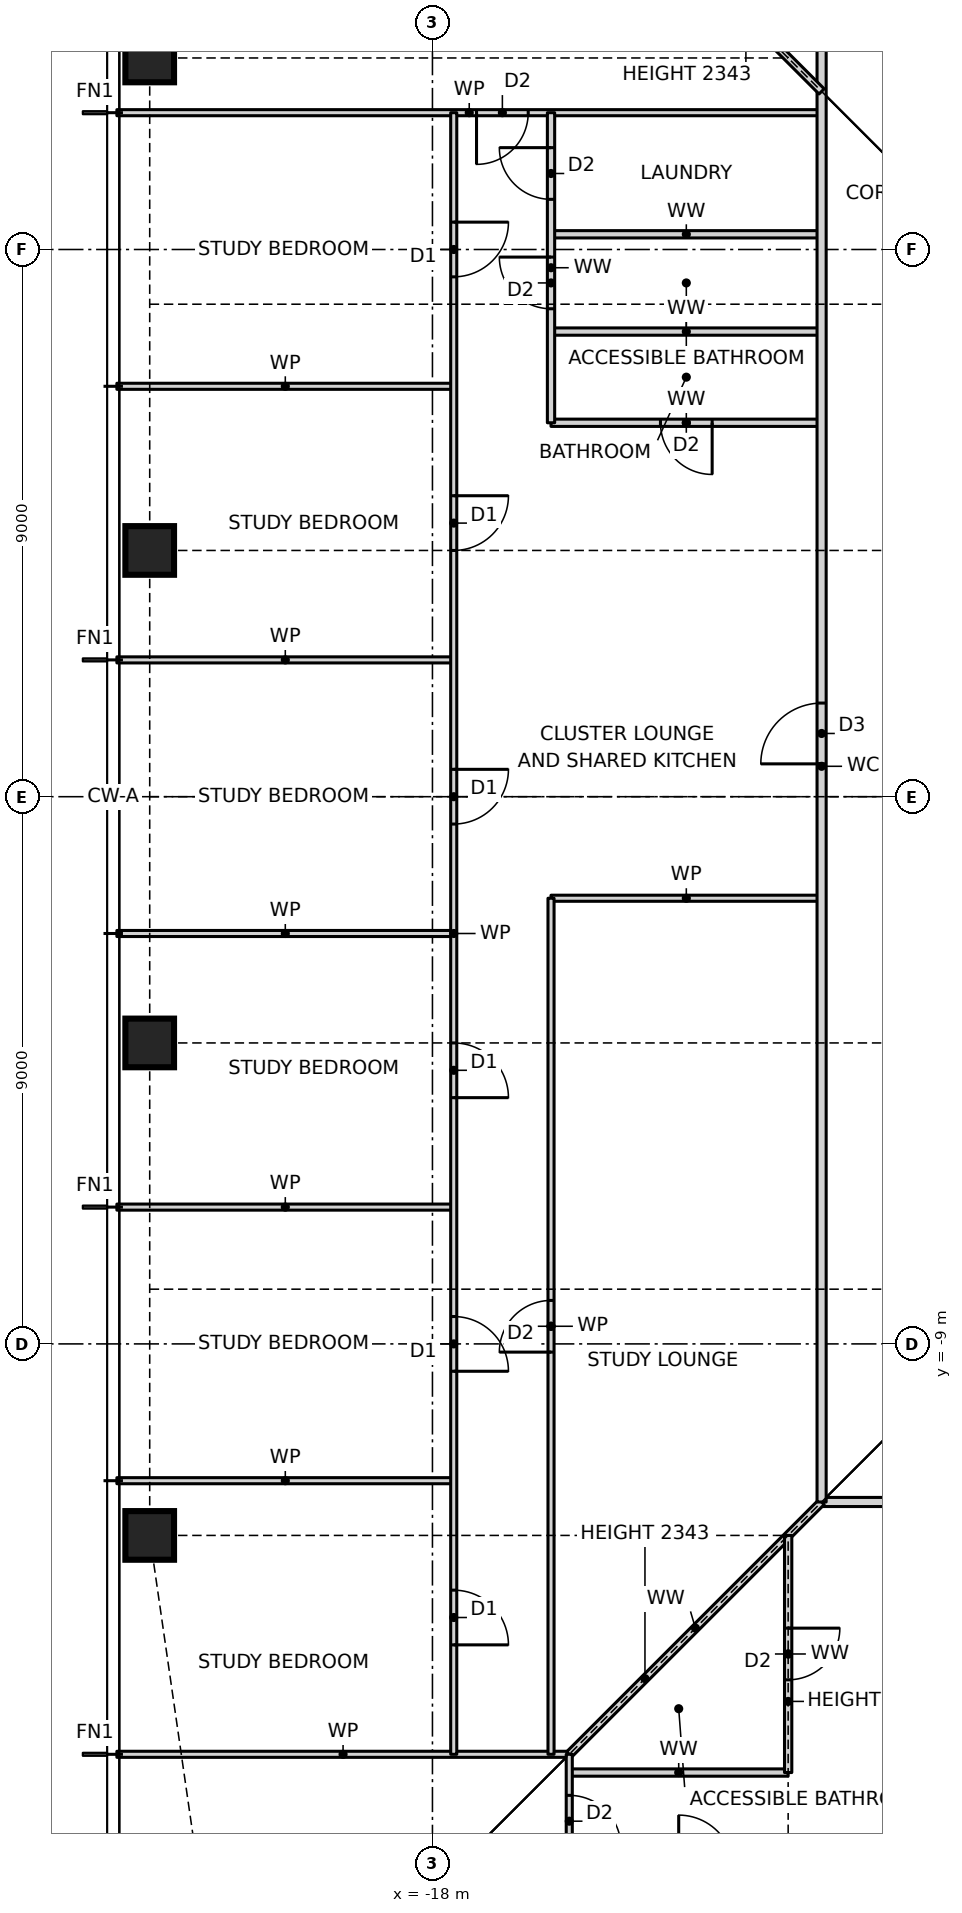
"""IFC4 building model, lengths in metres.
Left out: names, types, materials, properties, quantities, classifications, styles, units other than length and angle.
Written with IfcOpenShell. Run it as: python <this file> out.ifc"""

import sys

from ifc_helpers import new_model, si_unit, direction, frame, frame_2d, origin, origin_2d, place, context, subcontext, project, spatial, rectangle, hollow_rectangle, extrude, element, fill, save


model = new_model("IFC4")
c1 = context("Model", 3, precision=1e-05, world=origin(), true_north=direction((0.0, 1.0)))
c2 = subcontext(c1, "Body", "Model", "MODEL_VIEW")
j1 = project(units=[si_unit("LENGTHUNIT", "METRE"), si_unit("PLANEANGLEUNIT", "RADIAN")], contexts=[c1])
p1 = place(None, origin())
s1 = spatial("IfcSite", under=j1, at=p1, CompositionType="ELEMENT")
p2 = place(p1, origin())
s2 = spatial("IfcBuilding", under=s1, at=p2, CompositionType="ELEMENT")
p3 = place(p2, frame((0.0, 0.0, 43.0)))
s3 = spatial("IfcBuildingStorey", under=s2, at=p3, CompositionType="ELEMENT", Elevation=43.0)
for number, where, z_axis, x_axis in (
    (1, (-22.65, 12.15, 0.0), (0.0, 0.0, 1.0), (1.0, 0.0, 0.0)),
    (2, (-22.65, 4.05, 0.0), (0.0, 0.0, 1.0), (1.0, 0.0, 0.0)),
    (3, (-22.65, -4.05, 0.0), (0.0, 0.0, 1.0), (1.0, 0.0, 0.0)),
    (4, (-22.65, -12.15, 0.0), (0.0, 0.0, 1.0), (1.0, 0.0, 0.0)),
):
    element("IfcColumn", number, at=place(p3, frame(where, z_axis=z_axis, x_axis=x_axis)), inside=s3, PredefinedType="COLUMN", context=c2, shape_type="SweptSolid", body=[
        extrude(hollow_rectangle(XDim=0.8, YDim=0.8, WallThickness=0.09, at=origin_2d()), origin(), (0.0, 0.0, 1.0), 3.5),
    ])
p4 = place(p3, frame((-15.75, -16.05, 0.0), z_axis=(0.0, 0.0, 1.0), x_axis=(1.0, 0.0, 0.0)))
e5 = element("IfcWall", 5, at=p4, inside=s3, PredefinedType="PARTITIONING", context=c2, shape_type="SweptSolid", body=[
    extrude(rectangle(XDim=3.6, YDim=0.12, at=frame_2d((1.8, 0.0))), origin(), (0.0, 0.0, 1.0), 3.27),
])
p5 = place(p3, frame((-23.19, -15.75, 0.0), z_axis=(0.0, 0.0, 1.0), x_axis=(1.0, 0.0, 0.0)))
e6 = element("IfcWall", 6, at=p5, inside=s3, PredefinedType="PARTITIONING", context=c2, shape_type="SweptSolid", body=[
    extrude(rectangle(XDim=7.44, YDim=0.1, at=frame_2d((3.72, 0.0))), origin(), (0.0, 0.0, 1.0), 3.27),
])
p6 = place(p3, frame((-11.6, -11.6, 0.0), z_axis=(0.0, 0.0, 1.0), x_axis=(1.0, 0.0, 0.0)))
e7 = element("IfcWall", 7, at=p6, inside=s3, PredefinedType="PARTITIONING", context=c2, shape_type="SweptSolid", body=[
    extrude(rectangle(XDim=23.2, YDim=0.15, at=frame_2d((11.6, 0.0))), origin(), (0.0, 0.0, 1.0), 3.27),
])
p7 = place(p6, frame((2.975, 0.0, 0.0)))
e8 = element("IfcOpeningElement", 8, at=p7, cuts=e7, PredefinedType="OPENING", context=c2, shape_type="SweptSolid", body=[
    extrude(rectangle(XDim=1.0, YDim=2.1, at=frame_2d((0.5, 1.05))), frame((0.0, 0.085, 0.0), z_axis=(0.0, -1.0, 0.0), x_axis=(1.0, 0.0, 0.0)), (0.0, 0.0, 1.0), 0.17),
])
p8 = place(p6, frame((18.6, 0.0, 0.0)))
e9 = element("IfcOpeningElement", 9, at=p8, cuts=e7, PredefinedType="OPENING", context=c2, shape_type="SweptSolid", body=[
    extrude(rectangle(XDim=1.0, YDim=2.1, at=frame_2d((0.5, 1.05))), frame((0.0, 0.085, 0.0), z_axis=(0.0, -1.0, 0.0), x_axis=(1.0, 0.0, 0.0)), (0.0, 0.0, 1.0), 0.17),
])
for number, where, z_axis, x_axis in (
    (10, (-23.19, -11.25, 0.0), (0.0, 0.0, 1.0), (1.0, 0.0, 0.0)),
    (11, (-23.19, -6.75, 0.0), (0.0, 0.0, 1.0), (1.0, 0.0, 0.0)),
    (12, (-23.19, -2.25, 0.0), (0.0, 0.0, 1.0), (1.0, 0.0, 0.0)),
):
    element("IfcWall", number, at=place(p3, frame(where, z_axis=z_axis, x_axis=x_axis)), inside=s3, PredefinedType="PARTITIONING", context=c2, shape_type="SweptSolid", body=[
        extrude(rectangle(XDim=5.54, YDim=0.1, at=frame_2d((2.77, 0.0))), origin(), (0.0, 0.0, 1.0), 3.27),
    ])
p9 = place(p3, frame((-16.05, -1.67, 0.0), z_axis=(0.0, 0.0, 1.0), x_axis=(1.0, 0.0, 0.0)))
e13 = element("IfcWall", 13, at=p9, inside=s3, PredefinedType="PARTITIONING", context=c2, shape_type="SweptSolid", body=[
    extrude(rectangle(XDim=4.45, YDim=0.1, at=frame_2d((2.225, 0.0))), origin(), (0.0, 0.0, 1.0), 3.27),
])
p10 = place(p3, frame((-23.19, 2.25, 0.0), z_axis=(0.0, 0.0, 1.0), x_axis=(1.0, 0.0, 0.0)))
e14 = element("IfcWall", 14, at=p10, inside=s3, PredefinedType="PARTITIONING", context=c2, shape_type="SweptSolid", body=[
    extrude(rectangle(XDim=5.54, YDim=0.1, at=frame_2d((2.77, 0.0))), origin(), (0.0, 0.0, 1.0), 3.27),
])
p11 = place(p3, frame((-16.05, 6.15, 0.0), z_axis=(0.0, 0.0, 1.0), x_axis=(1.0, 0.0, 0.0)))
e15 = element("IfcWall", 15, at=p11, inside=s3, PredefinedType="PARTITIONING", context=c2, shape_type="SweptSolid", body=[
    extrude(rectangle(XDim=4.45, YDim=0.12, at=frame_2d((2.225, 0.0))), origin(), (0.0, 0.0, 1.0), 3.27),
])
p12 = place(p11, frame((1.8, 0.0, 0.0)))
e16 = element("IfcOpeningElement", 16, at=p12, cuts=e15, PredefinedType="OPENING", context=c2, shape_type="SweptSolid", body=[
    extrude(rectangle(XDim=0.85, YDim=2.1, at=frame_2d((0.425, 1.05))), frame((0.0, 0.07, 0.0), z_axis=(0.0, -1.0, 0.0), x_axis=(1.0, 0.0, 0.0)), (0.0, 0.0, 1.0), 0.14),
])
p13 = place(p3, frame((-23.19, 6.75, 0.0), z_axis=(0.0, 0.0, 1.0), x_axis=(1.0, 0.0, 0.0)))
e17 = element("IfcWall", 17, at=p13, inside=s3, PredefinedType="PARTITIONING", context=c2, shape_type="SweptSolid", body=[
    extrude(rectangle(XDim=5.54, YDim=0.1, at=frame_2d((2.77, 0.0))), origin(), (0.0, 0.0, 1.0), 3.27),
])
for number, where, z_axis, x_axis in (
    (18, (-16.05, 7.65, 0.0), (0.0, 0.0, 1.0), (1.0, 0.0, 0.0)),
    (19, (-16.05, 9.25, 0.0), (0.0, 0.0, 1.0), (1.0, 0.0, 0.0)),
):
    element("IfcWall", number, at=place(p3, frame(where, z_axis=z_axis, x_axis=x_axis)), inside=s3, PredefinedType="PARTITIONING", context=c2, shape_type="SweptSolid", body=[
        extrude(rectangle(XDim=4.45, YDim=0.12, at=frame_2d((2.225, 0.0))), origin(), (0.0, 0.0, 1.0), 3.27),
    ])
p14 = place(p3, frame((-23.19, 11.25, 0.0), z_axis=(0.0, 0.0, 1.0), x_axis=(1.0, 0.0, 0.0)))
e20 = element("IfcWall", 20, at=p14, inside=s3, PredefinedType="PARTITIONING", context=c2, shape_type="SweptSolid", body=[
    extrude(rectangle(XDim=11.59, YDim=0.1, at=frame_2d((5.795, 0.0))), origin(), (0.0, 0.0, 1.0), 3.27),
])
p15 = place(p14, frame((5.915, 0.0, 0.0)))
e21 = element("IfcOpeningElement", 21, at=p15, cuts=e20, PredefinedType="OPENING", context=c2, shape_type="SweptSolid", body=[
    extrude(rectangle(XDim=0.85, YDim=2.1, at=frame_2d((0.425, 1.05))), frame((0.0, 0.06, 0.0), z_axis=(0.0, -1.0, 0.0), x_axis=(1.0, 0.0, 0.0)), (0.0, 0.0, 1.0), 0.12),
])
p16 = place(p3, frame((-15.75, -15.75, 0.0), z_axis=(0.0, 0.0, 1.0), x_axis=(0.707106781187, 0.707106781187, 0.0)))
e22 = element("IfcWall", 22, at=p16, inside=s3, PredefinedType="PARTITIONING", context=c2, shape_type="SweptSolid", body=[
    extrude(rectangle(XDim=5.869, YDim=0.12, at=frame_2d((2.935, 0.0))), origin(), (0.0, 0.0, 1.0), 2.343),
])
p17 = place(p3, frame((-11.6, -11.6, 0.0), z_axis=(0.0, 0.0, 1.0), x_axis=(0.0, 1.0, 0.0)))
e23 = element("IfcWall", 23, at=p17, inside=s3, PredefinedType="PARTITIONING", context=c2, shape_type="SweptSolid", body=[
    extrude(rectangle(XDim=24.2, YDim=0.15, at=frame_2d((12.1, 0.0))), origin(), (0.0, 0.0, 1.0), 3.27),
])
p18 = place(p17, frame((12.14, 0.0, 0.0)))
e24 = element("IfcOpeningElement", 24, at=p18, cuts=e23, PredefinedType="OPENING", context=c2, shape_type="SweptSolid", body=[
    extrude(rectangle(XDim=1.0, YDim=2.1, at=frame_2d((0.5, 1.05))), frame((0.0, 0.085, 0.0), z_axis=(0.0, -1.0, 0.0), x_axis=(1.0, 0.0, 0.0)), (0.0, 0.0, 1.0), 0.17),
])
p19 = place(p3, frame((-12.15, -16.05, 0.0), z_axis=(0.0, 0.0, 1.0), x_axis=(0.0, 1.0, 0.0)))
e25 = element("IfcWall", 25, at=p19, inside=s3, PredefinedType="PARTITIONING", context=c2, shape_type="SweptSolid", body=[
    extrude(rectangle(XDim=3.9, YDim=0.12, at=frame_2d((1.95, 0.0))), origin(), (0.0, 0.0, 1.0), 2.508),
])
p20 = place(p19, frame((1.525, 0.0, 0.0)))
e26 = element("IfcOpeningElement", 26, at=p20, cuts=e25, PredefinedType="OPENING", context=c2, shape_type="SweptSolid", body=[
    extrude(rectangle(XDim=0.85, YDim=2.1, at=frame_2d((0.425, 1.05))), frame((0.0, 0.07, 0.0), z_axis=(0.0, -1.0, 0.0), x_axis=(1.0, 0.0, 0.0)), (0.0, 0.0, 1.0), 0.14),
])
p21 = place(p3, frame((-15.75, -23.19, 0.0), z_axis=(0.0, 0.0, 1.0), x_axis=(0.0, 1.0, 0.0)))
e27 = element("IfcWall", 27, at=p21, inside=s3, PredefinedType="PARTITIONING", context=c2, shape_type="SweptSolid", body=[
    extrude(rectangle(XDim=7.44, YDim=0.1, at=frame_2d((3.72, 0.0))), origin(), (0.0, 0.0, 1.0), 3.27),
])
p22 = place(p21, frame((5.915, 0.0, 0.0)))
e28 = element("IfcOpeningElement", 28, at=p22, cuts=e27, PredefinedType="OPENING", context=c2, shape_type="SweptSolid", body=[
    extrude(rectangle(XDim=0.85, YDim=2.1, at=frame_2d((0.425, 1.05))), frame((0.0, 0.06, 0.0), z_axis=(0.0, -1.0, 0.0), x_axis=(1.0, 0.0, 0.0)), (0.0, 0.0, 1.0), 0.12),
])
p23 = place(p3, frame((-16.05, -15.75, 0.0), z_axis=(0.0, 0.0, 1.0), x_axis=(0.0, 1.0, 0.0)))
e29 = element("IfcWall", 29, at=p23, inside=s3, PredefinedType="PARTITIONING", context=c2, shape_type="SweptSolid", body=[
    extrude(rectangle(XDim=14.08, YDim=0.1, at=frame_2d((7.04, 0.0))), origin(), (0.0, 0.0, 1.0), 3.27),
])
p24 = place(p23, frame((6.615, 0.0, 0.0)))
e30 = element("IfcOpeningElement", 30, at=p24, cuts=e29, PredefinedType="OPENING", context=c2, shape_type="SweptSolid", body=[
    extrude(rectangle(XDim=0.85, YDim=2.1, at=frame_2d((0.425, 1.05))), frame((0.0, 0.06, 0.0), z_axis=(0.0, -1.0, 0.0), x_axis=(1.0, 0.0, 0.0)), (0.0, 0.0, 1.0), 0.12),
])
p25 = place(p3, frame((-16.05, 6.15, 0.0), z_axis=(0.0, 0.0, 1.0), x_axis=(0.0, 1.0, 0.0)))
e31 = element("IfcWall", 31, at=p25, inside=s3, PredefinedType="PARTITIONING", context=c2, shape_type="SweptSolid", body=[
    extrude(rectangle(XDim=5.1, YDim=0.12, at=frame_2d((2.55, 0.0))), origin(), (0.0, 0.0, 1.0), 3.27),
])
p26 = place(p25, frame((3.675, 0.0, 0.0)))
e32 = element("IfcOpeningElement", 32, at=p26, cuts=e31, PredefinedType="OPENING", context=c2, shape_type="SweptSolid", body=[
    extrude(rectangle(XDim=0.85, YDim=2.1, at=frame_2d((0.425, 1.05))), frame((0.0, 0.07, 0.0), z_axis=(0.0, -1.0, 0.0), x_axis=(1.0, 0.0, 0.0)), (0.0, 0.0, 1.0), 0.14),
])
p27 = place(p25, frame((1.875, 0.0, 0.0)))
e33 = element("IfcOpeningElement", 33, at=p27, cuts=e31, PredefinedType="OPENING", context=c2, shape_type="SweptSolid", body=[
    extrude(rectangle(XDim=0.85, YDim=2.1, at=frame_2d((0.425, 1.05))), frame((0.0, 0.07, 0.0), z_axis=(0.0, -1.0, 0.0), x_axis=(1.0, 0.0, 0.0)), (0.0, 0.0, 1.0), 0.14),
])
p28 = place(p3, frame((-17.65, -15.75, 0.0), z_axis=(0.0, 0.0, 1.0), x_axis=(0.0, 1.0, 0.0)))
e34 = element("IfcWall", 34, at=p28, inside=s3, PredefinedType="PARTITIONING", context=c2, shape_type="SweptSolid", body=[
    extrude(rectangle(XDim=27.0, YDim=0.1, at=frame_2d((13.5, 0.0))), origin(), (0.0, 0.0, 1.0), 3.27),
])
p29 = place(p28, frame((24.3, 0.0, 0.0)))
e35 = element("IfcOpeningElement", 35, at=p29, cuts=e34, PredefinedType="OPENING", context=c2, shape_type="SweptSolid", body=[
    extrude(rectangle(XDim=0.9, YDim=2.1, at=frame_2d((0.45, 1.05))), frame((0.0, 0.06, 0.0), z_axis=(0.0, -1.0, 0.0), x_axis=(1.0, 0.0, 0.0)), (0.0, 0.0, 1.0), 0.12),
])
p30 = place(p28, frame((19.8, 0.0, 0.0)))
e36 = element("IfcOpeningElement", 36, at=p30, cuts=e34, PredefinedType="OPENING", context=c2, shape_type="SweptSolid", body=[
    extrude(rectangle(XDim=0.9, YDim=2.1, at=frame_2d((0.45, 1.05))), frame((0.0, 0.06, 0.0), z_axis=(0.0, -1.0, 0.0), x_axis=(1.0, 0.0, 0.0)), (0.0, 0.0, 1.0), 0.12),
])
p31 = place(p28, frame((15.3, 0.0, 0.0)))
e37 = element("IfcOpeningElement", 37, at=p31, cuts=e34, PredefinedType="OPENING", context=c2, shape_type="SweptSolid", body=[
    extrude(rectangle(XDim=0.9, YDim=2.1, at=frame_2d((0.45, 1.05))), frame((0.0, 0.06, 0.0), z_axis=(0.0, -1.0, 0.0), x_axis=(1.0, 0.0, 0.0)), (0.0, 0.0, 1.0), 0.12),
])
p32 = place(p28, frame((10.8, 0.0, 0.0)))
e38 = element("IfcOpeningElement", 38, at=p32, cuts=e34, PredefinedType="OPENING", context=c2, shape_type="SweptSolid", body=[
    extrude(rectangle(XDim=0.9, YDim=2.1, at=frame_2d((0.45, 1.05))), frame((0.0, 0.06, 0.0), z_axis=(0.0, -1.0, 0.0), x_axis=(1.0, 0.0, 0.0)), (0.0, 0.0, 1.0), 0.12),
])
p33 = place(p28, frame((6.3, 0.0, 0.0)))
e39 = element("IfcOpeningElement", 39, at=p33, cuts=e34, PredefinedType="OPENING", context=c2, shape_type="SweptSolid", body=[
    extrude(rectangle(XDim=0.9, YDim=2.1, at=frame_2d((0.45, 1.05))), frame((0.0, 0.06, 0.0), z_axis=(0.0, -1.0, 0.0), x_axis=(1.0, 0.0, 0.0)), (0.0, 0.0, 1.0), 0.12),
])
p34 = place(p28, frame((1.8, 0.0, 0.0)))
e40 = element("IfcOpeningElement", 40, at=p34, cuts=e34, PredefinedType="OPENING", context=c2, shape_type="SweptSolid", body=[
    extrude(rectangle(XDim=0.9, YDim=2.1, at=frame_2d((0.45, 1.05))), frame((0.0, 0.06, 0.0), z_axis=(0.0, -1.0, 0.0), x_axis=(1.0, 0.0, 0.0)), (0.0, 0.0, 1.0), 0.12),
])
p35 = place(p3, frame((-11.6, 11.6, 0.0), z_axis=(0.0, 0.0, 1.0), x_axis=(-0.707106781187, 0.707106781187, 0.0)))
e41 = element("IfcWall", 41, at=p35, inside=s3, PredefinedType="PARTITIONING", context=c2, shape_type="SweptSolid", body=[
    extrude(rectangle(XDim=5.869, YDim=0.12, at=frame_2d((2.935, 0.0))), origin(), (0.0, 0.0, 1.0), 2.343),
])
p36 = place(p20, frame((0.85, 0.0, 0.0), z_axis=(0.0, 0.0, 1.0), x_axis=(-1.0, 0.0, 0.0)))
e42 = element("IfcDoor", 42, at=p36, inside=s3, OperationType="SINGLE_SWING_LEFT", PredefinedType="DOOR", context=c2, shape_type="SweptSolid", body=[
    extrude(rectangle(XDim=0.85, YDim=2.1, at=frame_2d((0.425, 1.05))), frame((0.0, 0.025, 0.0), z_axis=(0.0, -1.0, 0.0), x_axis=(1.0, 0.0, 0.0)), (0.0, 0.0, 1.0), 0.05),
])
fill(e26, e42)
p37 = place(p15, frame((0.85, 0.0, 0.0), z_axis=(0.0, 0.0, 1.0), x_axis=(-1.0, 0.0, 0.0)))
e43 = element("IfcDoor", 43, at=p37, inside=s3, OperationType="SINGLE_SWING_RIGHT", PredefinedType="DOOR", context=c2, shape_type="SweptSolid", body=[
    extrude(rectangle(XDim=0.85, YDim=2.1, at=frame_2d((0.425, 1.05))), frame((0.0, 0.025, 0.0), z_axis=(0.0, -1.0, 0.0), x_axis=(1.0, 0.0, 0.0)), (0.0, 0.0, 1.0), 0.05),
])
fill(e21, e43)
p38 = place(p29, frame((0.9, 0.0, 0.0), z_axis=(0.0, 0.0, 1.0), x_axis=(-1.0, 0.0, 0.0)))
e44 = element("IfcDoor", 44, at=p38, inside=s3, OperationType="SINGLE_SWING_LEFT", PredefinedType="DOOR", context=c2, shape_type="SweptSolid", body=[
    extrude(rectangle(XDim=0.9, YDim=2.1, at=frame_2d((0.45, 1.05))), frame((0.0, 0.025, 0.0), z_axis=(0.0, -1.0, 0.0), x_axis=(1.0, 0.0, 0.0)), (0.0, 0.0, 1.0), 0.05),
])
fill(e35, e44)
p39 = place(p30, frame((0.9, 0.0, 0.0), z_axis=(0.0, 0.0, 1.0), x_axis=(-1.0, 0.0, 0.0)))
e45 = element("IfcDoor", 45, at=p39, inside=s3, OperationType="SINGLE_SWING_LEFT", PredefinedType="DOOR", context=c2, shape_type="SweptSolid", body=[
    extrude(rectangle(XDim=0.9, YDim=2.1, at=frame_2d((0.45, 1.05))), frame((0.0, 0.025, 0.0), z_axis=(0.0, -1.0, 0.0), x_axis=(1.0, 0.0, 0.0)), (0.0, 0.0, 1.0), 0.05),
])
fill(e36, e45)
p40 = place(p31, frame((0.9, 0.0, 0.0), z_axis=(0.0, 0.0, 1.0), x_axis=(-1.0, 0.0, 0.0)))
e46 = element("IfcDoor", 46, at=p40, inside=s3, OperationType="SINGLE_SWING_LEFT", PredefinedType="DOOR", context=c2, shape_type="SweptSolid", body=[
    extrude(rectangle(XDim=0.9, YDim=2.1, at=frame_2d((0.45, 1.05))), frame((0.0, 0.025, 0.0), z_axis=(0.0, -1.0, 0.0), x_axis=(1.0, 0.0, 0.0)), (0.0, 0.0, 1.0), 0.05),
])
fill(e37, e46)
p41 = place(p32, frame((0.9, 0.0, 0.0), z_axis=(0.0, 0.0, 1.0), x_axis=(-1.0, 0.0, 0.0)))
e47 = element("IfcDoor", 47, at=p41, inside=s3, OperationType="SINGLE_SWING_RIGHT", PredefinedType="DOOR", context=c2, shape_type="SweptSolid", body=[
    extrude(rectangle(XDim=0.9, YDim=2.1, at=frame_2d((0.45, 1.05))), frame((0.0, 0.025, 0.0), z_axis=(0.0, -1.0, 0.0), x_axis=(1.0, 0.0, 0.0)), (0.0, 0.0, 1.0), 0.05),
])
fill(e38, e47)
p42 = place(p33, frame((0.9, 0.0, 0.0), z_axis=(0.0, 0.0, 1.0), x_axis=(-1.0, 0.0, 0.0)))
e48 = element("IfcDoor", 48, at=p42, inside=s3, OperationType="SINGLE_SWING_RIGHT", PredefinedType="DOOR", context=c2, shape_type="SweptSolid", body=[
    extrude(rectangle(XDim=0.9, YDim=2.1, at=frame_2d((0.45, 1.05))), frame((0.0, 0.025, 0.0), z_axis=(0.0, -1.0, 0.0), x_axis=(1.0, 0.0, 0.0)), (0.0, 0.0, 1.0), 0.05),
])
fill(e39, e48)
p43 = place(p34, frame((0.9, 0.0, 0.0), z_axis=(0.0, 0.0, 1.0), x_axis=(-1.0, 0.0, 0.0)))
e49 = element("IfcDoor", 49, at=p43, inside=s3, OperationType="SINGLE_SWING_RIGHT", PredefinedType="DOOR", context=c2, shape_type="SweptSolid", body=[
    extrude(rectangle(XDim=0.9, YDim=2.1, at=frame_2d((0.45, 1.05))), frame((0.0, 0.025, 0.0), z_axis=(0.0, -1.0, 0.0), x_axis=(1.0, 0.0, 0.0)), (0.0, 0.0, 1.0), 0.05),
])
fill(e40, e49)
p44 = place(p18, origin())
e50 = element("IfcDoor", 50, at=p44, inside=s3, OperationType="SINGLE_SWING_LEFT", PredefinedType="DOOR", context=c2, shape_type="SweptSolid", body=[
    extrude(rectangle(XDim=1.0, YDim=2.1, at=frame_2d((0.5, 1.05))), frame((0.0, 0.025, 0.0), z_axis=(0.0, -1.0, 0.0), x_axis=(1.0, 0.0, 0.0)), (0.0, 0.0, 1.0), 0.05),
])
fill(e24, e50)
p45 = place(p26, origin())
e51 = element("IfcDoor", 51, at=p45, inside=s3, OperationType="SINGLE_SWING_RIGHT", PredefinedType="DOOR", context=c2, shape_type="SweptSolid", body=[
    extrude(rectangle(XDim=0.85, YDim=2.1, at=frame_2d((0.425, 1.05))), frame((0.0, 0.025, 0.0), z_axis=(0.0, -1.0, 0.0), x_axis=(1.0, 0.0, 0.0)), (0.0, 0.0, 1.0), 0.05),
])
fill(e32, e51)
p46 = place(p27, origin())
e52 = element("IfcDoor", 52, at=p46, inside=s3, OperationType="SINGLE_SWING_RIGHT", PredefinedType="DOOR", context=c2, shape_type="SweptSolid", body=[
    extrude(rectangle(XDim=0.85, YDim=2.1, at=frame_2d((0.425, 1.05))), frame((0.0, 0.025, 0.0), z_axis=(0.0, -1.0, 0.0), x_axis=(1.0, 0.0, 0.0)), (0.0, 0.0, 1.0), 0.05),
])
fill(e33, e52)
p47 = place(p12, frame((0.85, 0.0, 0.0), z_axis=(0.0, 0.0, 1.0), x_axis=(-1.0, 0.0, 0.0)))
e53 = element("IfcDoor", 53, at=p47, inside=s3, OperationType="SINGLE_SWING_LEFT", PredefinedType="DOOR", context=c2, shape_type="SweptSolid", body=[
    extrude(rectangle(XDim=0.85, YDim=2.1, at=frame_2d((0.425, 1.05))), frame((0.0, 0.025, 0.0), z_axis=(0.0, -1.0, 0.0), x_axis=(1.0, 0.0, 0.0)), (0.0, 0.0, 1.0), 0.05),
])
fill(e16, e53)
p48 = place(p24, origin())
e54 = element("IfcDoor", 54, at=p48, inside=s3, OperationType="SINGLE_SWING_LEFT", PredefinedType="DOOR", context=c2, shape_type="SweptSolid", body=[
    extrude(rectangle(XDim=0.85, YDim=2.1, at=frame_2d((0.425, 1.05))), frame((0.0, 0.025, 0.0), z_axis=(0.0, -1.0, 0.0), x_axis=(1.0, 0.0, 0.0)), (0.0, 0.0, 1.0), 0.05),
])
fill(e30, e54)
p49 = place(p22, frame((0.85, 0.0, 0.0), z_axis=(0.0, 0.0, 1.0), x_axis=(-1.0, 0.0, 0.0)))
e55 = element("IfcDoor", 55, at=p49, inside=s3, OperationType="SINGLE_SWING_RIGHT", PredefinedType="DOOR", context=c2, shape_type="SweptSolid", body=[
    extrude(rectangle(XDim=0.85, YDim=2.1, at=frame_2d((0.425, 1.05))), frame((0.0, 0.025, 0.0), z_axis=(0.0, -1.0, 0.0), x_axis=(1.0, 0.0, 0.0)), (0.0, 0.0, 1.0), 0.05),
])
fill(e28, e55)
save(model, sys.argv[1])
